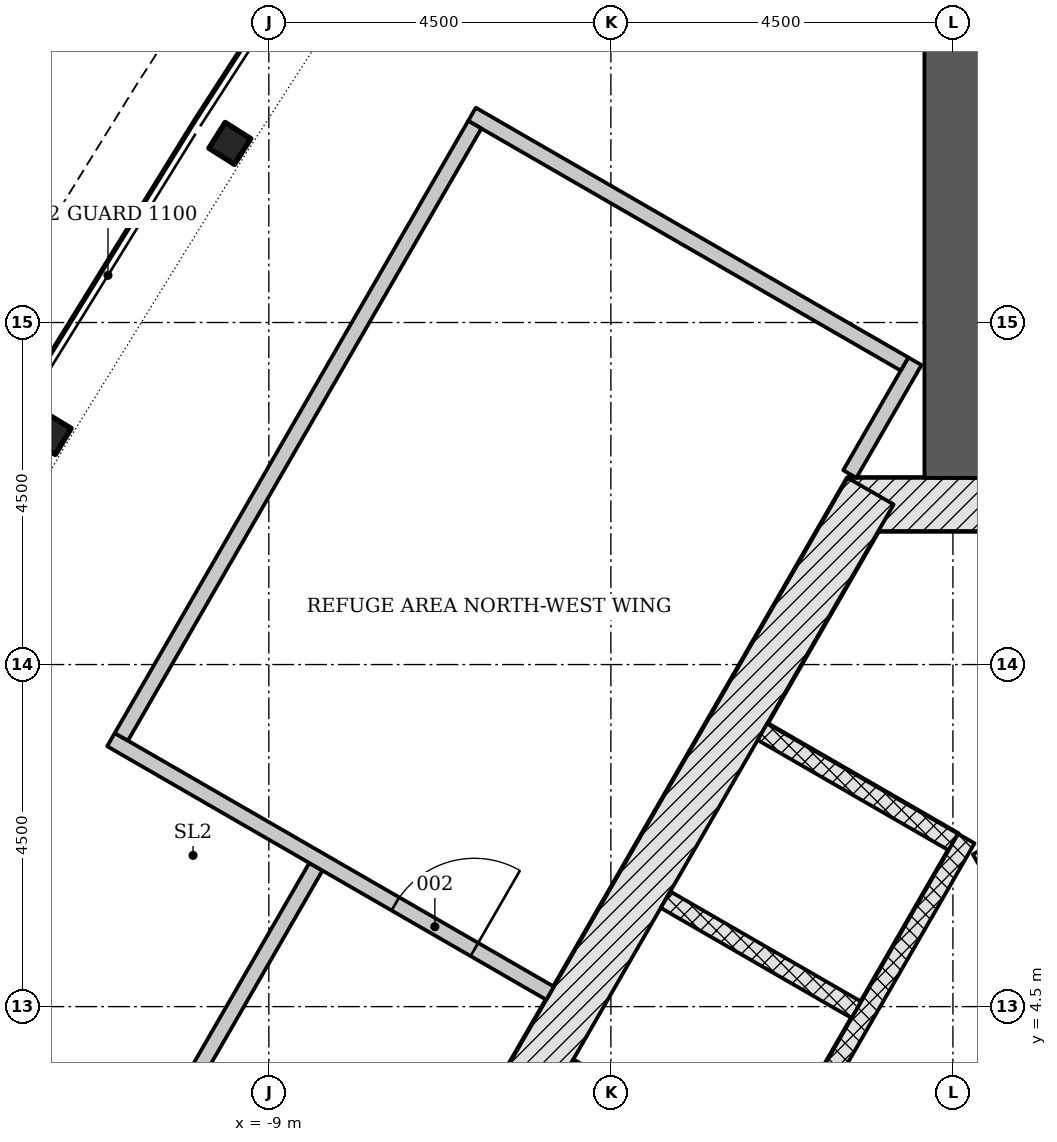
"""IFC4 building model, lengths in metres.
Left out: names, types, materials, properties, quantities, classifications, styles, units other than length and angle.
Written with IfcOpenShell. Run it as: python <this file> out.ifc"""

import sys

from ifc_helpers import new_model, si_unit, direction, frame, frame_2d, origin, origin_2d, place, context, subcontext, project, spatial, rectangle, i_section, extrude, element, fill, save


model = new_model("IFC4")
c1 = context("Model", 3, precision=1e-05, world=origin(), true_north=direction((0.0, 1.0)))
c2 = subcontext(c1, "Body", "Model", "MODEL_VIEW")
j1 = project(units=[si_unit("LENGTHUNIT", "METRE"), si_unit("PLANEANGLEUNIT", "RADIAN")], contexts=[c1])
p1 = place(None, origin())
s1 = spatial("IfcSite", under=j1, at=p1, CompositionType="ELEMENT")
p2 = place(p1, origin())
s2 = spatial("IfcBuilding", under=s1, at=p2, CompositionType="ELEMENT")
p3 = place(p2, frame((0.0, 0.0, 127.5)))
s3 = spatial("IfcBuildingStorey", under=s2, at=p3, CompositionType="ELEMENT", Elevation=127.5)
p4 = place(p3, frame((1.386, 11.106, -0.3), z_axis=(0.0, 0.0, 1.0), x_axis=(-1.0, 0.0, 0.0)))
e1 = element("IfcWall", 1, at=p4, inside=s3, PredefinedType="SHEAR", context=c2, shape_type="SweptSolid", body=[
    extrude(rectangle(XDim=2.771, YDim=0.7, at=frame_2d((1.386, 0.0))), origin(), (0.0, 0.0, 1.0), 7.2),
])
p5 = place(p3, frame((-1.083, 11.281, -0.3), z_axis=(0.0, 0.0, 1.0), x_axis=(-0.500001446645, -0.866024568562, 0.0)))
e2 = element("IfcWall", 2, at=p5, inside=s3, PredefinedType="SHEAR", context=c2, shape_type="SweptSolid", body=[
    extrude(rectangle(XDim=18.458, YDim=0.7, at=frame_2d((9.229, 0.0))), origin(), (0.0, 0.0, 1.0), 7.2),
])
p6 = place(p5, frame((8.979, 0.0, 0.3)))
e3 = element("IfcOpeningElement", 3, at=p6, cuts=e2, PredefinedType="OPENING", context=c2, shape_type="SweptSolid", body=[
    extrude(rectangle(XDim=1.2, YDim=2.1, at=frame_2d((0.6, 1.05))), frame((0.0, 0.36, 0.0), z_axis=(0.0, -1.0, 0.0), x_axis=(1.0, 0.0, 0.0)), (0.0, 0.0, 1.0), 0.72),
])
p7 = place(p5, frame((11.029, 0.0, 0.3)))
e4 = element("IfcOpeningElement", 4, at=p7, cuts=e2, PredefinedType="OPENING", context=c2, shape_type="SweptSolid", body=[
    extrude(rectangle(XDim=1.2, YDim=2.1, at=frame_2d((0.6, 1.05))), frame((0.0, 0.36, 0.0), z_axis=(0.0, -1.0, 0.0), x_axis=(1.0, 0.0, 0.0)), (0.0, 0.0, 1.0), 0.72),
])
p8 = place(p3, frame((0.0, 11.456, -0.3), z_axis=(0.0, 0.0, 1.0), x_axis=(0.0, 1.0, 0.0)))
e5 = element("IfcWall", 5, at=p8, inside=s3, PredefinedType="SHEAR", context=c2, shape_type="SweptSolid", body=[
    extrude(rectangle(XDim=11.539, YDim=0.75, at=frame_2d((5.77, 0.0))), origin(), (0.0, 0.0, 1.0), 7.2),
])
for number, where, z_axis, x_axis in (
    (6, (-9.513, 15.856, -0.3), (0.0, 0.0, 1.0), (-0.535, -0.845, 0.0)),
    (7, (-11.875, 12.039, -0.3), (0.0, 0.0, 1.0), (-0.517, -0.856, 0.0)),
):
    element("IfcColumn", number, at=place(p3, frame(where, z_axis=z_axis, x_axis=x_axis)), inside=s3, PredefinedType="COLUMN", context=c2, shape_type="SweptSolid", body=[
        extrude(i_section(OverallWidth=0.401, OverallDepth=0.399, WebThickness=0.025, FlangeThickness=0.04, FilletRadius=0.015, at=origin_2d()), origin(), (0.0, 0.0, 1.0), 7.2),
    ])
p9 = place(p3, frame((5.87, -2.961, 0.0), z_axis=(0.0, 0.0, 1.0), x_axis=(-0.50000615651, 0.866021849293, 0.0)))
e8 = element("IfcWall", 8, at=p9, inside=s3, PredefinedType="PARTITIONING", context=c2, shape_type="SweptSolid", body=[
    extrude(rectangle(XDim=11.0, YDim=0.25, at=frame_2d((5.5, 0.0))), origin(), (0.0, 0.0, 1.0), 6.9),
])
p10 = place(p3, frame((-2.506, 8.115, -0.3), z_axis=(0.0, 0.0, 1.0), x_axis=(0.865996321171, -0.50005036918, 0.0)))
e9 = element("IfcWall", 9, at=p10, inside=s3, PredefinedType="PARTITIONING", context=c2, shape_type="SweptSolid", body=[
    extrude(rectangle(XDim=2.9, YDim=0.25, at=frame_2d((1.45, 0.0))), origin(), (0.0, 0.0, 1.0), 7.2),
])
for number, where, z_axis, x_axis in (
    (10, (-3.781, 5.907, -0.3), (0.0, 0.0, 1.0), (0.866, -0.5, 0.0)),
    (11, (-5.056, 3.699, -0.3), (0.0, 0.0, 1.0), (0.866, -0.5, 0.0)),
):
    element("IfcWall", number, at=place(p3, frame(where, z_axis=z_axis, x_axis=x_axis)), inside=s3, PredefinedType="PARTITIONING", context=c2, shape_type="SweptSolid", body=[
        extrude(rectangle(XDim=2.9, YDim=0.25, at=frame_2d((1.45, 0.0))), origin(), (0.0, 0.0, 1.0), 7.2),
    ])
p11 = place(p3, frame((0.176, 6.711, 0.0), z_axis=(0.0, 0.0, 1.0), x_axis=(-0.500004227369, -0.866022963098, 0.0)))
e12 = element("IfcWall", 12, at=p11, inside=s3, PredefinedType="PARTITIONING", context=c2, shape_type="SweptSolid", body=[
    extrude(rectangle(XDim=11.8, YDim=0.25, at=frame_2d((5.9, 0.0))), origin(), (0.0, 0.0, 1.0), 6.9),
])
p12 = place(p3, frame((-12.658, -1.068, 0.0), z_axis=(0.0, 0.0, 1.0), x_axis=(0.500000816281, 0.866024932504, 0.0)))
e13 = element("IfcWall", 13, at=p12, inside=s3, PredefinedType="PARTITIONING", context=c2, shape_type="SweptSolid", body=[
    extrude(rectangle(XDim=8.554, YDim=0.2, at=frame_2d((4.277, 0.0))), origin(), (0.0, 0.0, 1.0), 6.347),
])
p13 = place(p12, frame((3.198, 0.0, 0.0)))
e14 = element("IfcOpeningElement", 14, at=p13, cuts=e13, PredefinedType="OPENING", context=c2, shape_type="SweptSolid", body=[
    extrude(rectangle(XDim=1.2, YDim=2.1, at=frame_2d((0.6, 1.05))), frame((0.0, 0.11, 0.0), z_axis=(0.0, -1.0, 0.0), x_axis=(1.0, 0.0, 0.0)), (0.0, 0.0, 1.0), 0.22),
])
p14 = place(p3, frame((-11.077, 8.012, 0.0), z_axis=(0.0, 0.0, 1.0), x_axis=(0.866022858982, -0.500004407701, 0.0)))
e15 = element("IfcWall", 15, at=p14, inside=s3, PredefinedType="PARTITIONING", context=c2, shape_type="SweptSolid", body=[
    extrude(rectangle(XDim=6.671, YDim=0.2, at=frame_2d((3.335, 0.0))), origin(), (0.0, 0.0, 1.0), 6.9),
])
p15 = place(p14, frame((4.321, 0.0, 0.0)))
e16 = element("IfcOpeningElement", 16, at=p15, cuts=e15, PredefinedType="OPENING", context=c2, shape_type="SweptSolid", body=[
    extrude(rectangle(XDim=1.2, YDim=2.1, at=frame_2d((0.6, 1.05))), frame((0.0, 0.11, 0.0), z_axis=(0.0, -1.0, 0.0), x_axis=(1.0, 0.0, 0.0)), (0.0, 0.0, 1.0), 0.22),
])
p16 = place(p3, frame((-1.357, 11.506, 0.0), z_axis=(0.0, 0.0, 1.0), x_axis=(0.499923888995, 0.866069342035, 0.0)))
e17 = element("IfcWall", 17, at=p16, inside=s3, PredefinedType="PARTITIONING", context=c2, shape_type="SweptSolid", body=[
    extrude(rectangle(XDim=1.714, YDim=0.2, at=frame_2d((0.857, 0.0))), origin(), (0.0, 0.0, 1.0), 6.9),
])
p17 = place(p3, frame((-0.637, 12.954, 0.0), z_axis=(0.0, 0.0, 1.0), x_axis=(-0.86602347431, 0.500003341933, 0.0)))
e18 = element("IfcWall", 18, at=p17, inside=s3, PredefinedType="PARTITIONING", context=c2, shape_type="SweptSolid", body=[
    extrude(rectangle(XDim=6.571, YDim=0.2, at=frame_2d((3.285, 0.0))), origin(), (0.0, 0.0, 1.0), 6.9),
])
p18 = place(p3, frame((-6.291, 16.103, 0.0), z_axis=(0.0, 0.0, 1.0), x_axis=(-0.500015592816, -0.866016401081, 0.0)))
e19 = element("IfcWall", 19, at=p18, inside=s3, PredefinedType="PARTITIONING", context=c2, shape_type="SweptSolid", body=[
    extrude(rectangle(XDim=9.3, YDim=0.2, at=frame_2d((4.65, 0.0))), origin(), (0.0, 0.0, 1.0), 6.347),
])
p19 = place(p15, origin())
e20 = element("IfcDoor", 20, at=p19, inside=s3, OperationType="SINGLE_SWING_RIGHT", PredefinedType="DOOR", context=c2, shape_type="SweptSolid", body=[
    extrude(rectangle(XDim=1.2, YDim=2.1, at=frame_2d((0.6, 1.05))), frame((0.0, 0.025, 0.0), z_axis=(0.0, -1.0, 0.0), x_axis=(1.0, 0.0, 0.0)), (0.0, 0.0, 1.0), 0.05),
])
fill(e16, e20)
save(model, sys.argv[1])
